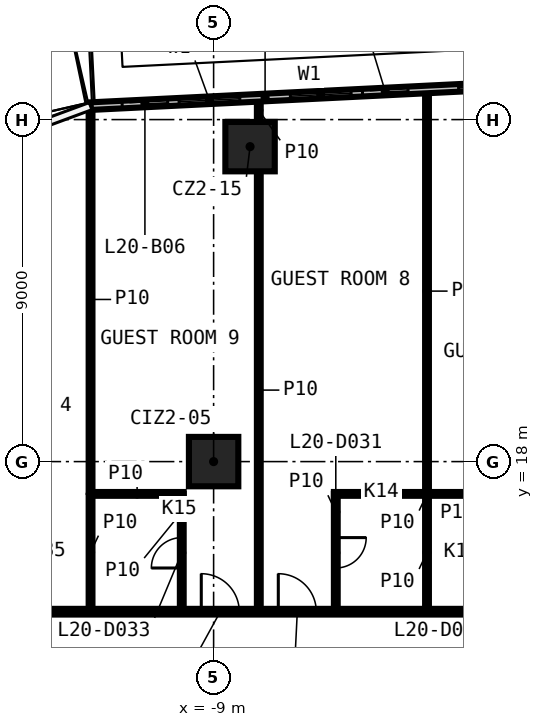
"""IFC4 building model, lengths in metres.
Left out: names, types, materials, properties, quantities, classifications, styles, units other than length and angle.
Written with IfcOpenShell. Run it as: python <this file> out.ifc"""

import sys

from ifc_helpers import new_model, si_unit, direction, frame, frame_2d, origin, origin_2d, place, context, subcontext, project, spatial, rectangle, extrude, element, fill, save


model = new_model("IFC4")
c1 = context("Model", 3, precision=1e-05, world=origin(), true_north=direction((0.0, 1.0)))
c2 = subcontext(c1, "Body", "Model", "MODEL_VIEW")
j1 = project(units=[si_unit("LENGTHUNIT", "METRE"), si_unit("PLANEANGLEUNIT", "RADIAN")], contexts=[c1])
p1 = place(None, origin())
s1 = spatial("IfcSite", under=j1, at=p1, CompositionType="ELEMENT")
p2 = place(p1, origin())
s2 = spatial("IfcBuilding", under=s1, at=p2, CompositionType="ELEMENT")
p3 = place(p2, frame((0.0, 0.0, 98.9)))
s3 = spatial("IfcBuildingStorey", under=s2, at=p3, CompositionType="ELEMENT", Elevation=98.9)
for number, where, z_axis, x_axis in (
    (1, (-8.041, 26.288, 0.0), (0.0, 0.0, 1.0), (1.0, 0.0, 0.0)),
    (2, (-9.0, 18.0, 0.0), (0.0, 0.0, 1.0), (1.0, 0.0, 0.0)),
):
    element("IfcColumn", number, at=place(p3, frame(where, z_axis=z_axis, x_axis=x_axis)), inside=s3, PredefinedType="COLUMN", context=c2, shape_type="SweptSolid", body=[
        extrude(rectangle(XDim=1.3, YDim=1.3, at=origin_2d()), origin(), (0.0, 0.0, 1.0), 3.25),
    ])
p4 = place(p3, frame((-17.125, 14.05, 0.0), z_axis=(0.0, 0.0, 1.0), x_axis=(1.0, 0.0, 0.0)))
e3 = element("IfcWall", 3, at=p4, inside=s3, PredefinedType="PARTITIONING", context=c2, shape_type="SweptSolid", body=[
    extrude(rectangle(XDim=34.25, YDim=0.15, at=frame_2d((17.125, 0.0))), origin(), (0.0, 0.0, 1.0), 3.25),
])
p5 = place(p4, frame((29.757, 0.0, 0.0)))
e4 = element("IfcOpeningElement", 4, at=p5, cuts=e3, PredefinedType="OPENING", context=c2, shape_type="SweptSolid", body=[
    extrude(rectangle(XDim=1.0, YDim=2.1, at=frame_2d((0.5, 1.05))), frame((0.0, 0.085, 0.0), z_axis=(0.0, -1.0, 0.0), x_axis=(1.0, 0.0, 0.0)), (0.0, 0.0, 1.0), 0.17),
])
p6 = place(p4, frame((18.682, 0.0, 0.0)))
e5 = element("IfcOpeningElement", 5, at=p6, cuts=e3, PredefinedType="OPENING", context=c2, shape_type="SweptSolid", body=[
    extrude(rectangle(XDim=1.0, YDim=2.1, at=frame_2d((0.5, 1.05))), frame((0.0, 0.085, 0.0), z_axis=(0.0, -1.0, 0.0), x_axis=(1.0, 0.0, 0.0)), (0.0, 0.0, 1.0), 0.17),
])
p7 = place(p4, frame((16.654, 0.0, 0.0)))
e6 = element("IfcOpeningElement", 6, at=p7, cuts=e3, PredefinedType="OPENING", context=c2, shape_type="SweptSolid", body=[
    extrude(rectangle(XDim=1.0, YDim=2.1, at=frame_2d((0.5, 1.05))), frame((0.0, 0.085, 0.0), z_axis=(0.0, -1.0, 0.0), x_axis=(1.0, 0.0, 0.0)), (0.0, 0.0, 1.0), 0.17),
])
p8 = place(p4, frame((9.827, 0.0, 0.0)))
e7 = element("IfcOpeningElement", 7, at=p8, cuts=e3, PredefinedType="OPENING", context=c2, shape_type="SweptSolid", body=[
    extrude(rectangle(XDim=1.0, YDim=2.1, at=frame_2d((0.5, 1.05))), frame((0.0, 0.085, 0.0), z_axis=(0.0, -1.0, 0.0), x_axis=(1.0, 0.0, 0.0)), (0.0, 0.0, 1.0), 0.17),
])
p9 = place(p4, frame((7.8, 0.0, 0.0)))
e8 = element("IfcOpeningElement", 8, at=p9, cuts=e3, PredefinedType="OPENING", context=c2, shape_type="SweptSolid", body=[
    extrude(rectangle(XDim=1.0, YDim=2.1, at=frame_2d((0.5, 1.05))), frame((0.0, 0.085, 0.0), z_axis=(0.0, -1.0, 0.0), x_axis=(1.0, 0.0, 0.0)), (0.0, 0.0, 1.0), 0.17),
])
p10 = place(p4, frame((2.56, 0.0, 0.0)))
e9 = element("IfcOpeningElement", 9, at=p10, cuts=e3, PredefinedType="OPENING", context=c2, shape_type="SweptSolid", body=[
    extrude(rectangle(XDim=0.9, YDim=2.1, at=frame_2d((0.45, 1.05))), frame((0.0, 0.085, 0.0), z_axis=(0.0, -1.0, 0.0), x_axis=(1.0, 0.0, 0.0)), (0.0, 0.0, 1.0), 0.17),
])
p11 = place(p3, frame((-12.238, 17.15, 0.0), z_axis=(0.0, 0.0, 1.0), x_axis=(1.0, 0.0, 0.0)))
e10 = element("IfcWall", 10, at=p11, inside=s3, PredefinedType="PARTITIONING", context=c2, shape_type="SweptSolid", body=[
    extrude(rectangle(XDim=2.45, YDim=0.1, at=frame_2d((1.225, 0.0))), origin(), (0.0, 0.0, 1.0), 3.25),
])
p12 = place(p3, frame((-5.834, 17.15, 0.0), z_axis=(0.0, 0.0, 1.0), x_axis=(1.0, 0.0, 0.0)))
e11 = element("IfcWall", 11, at=p12, inside=s3, PredefinedType="PARTITIONING", context=c2, shape_type="SweptSolid", body=[
    extrude(rectangle(XDim=4.9, YDim=0.1, at=frame_2d((2.45, 0.0))), origin(), (0.0, 0.0, 1.0), 3.25),
])
p13 = place(p3, frame((-3.385, 14.125, 0.0), z_axis=(0.0, 0.0, 1.0), x_axis=(0.0, 1.0, 0.0)))
e12 = element("IfcWall", 12, at=p13, inside=s3, PredefinedType="PARTITIONING", context=c2, shape_type="SweptSolid", body=[
    extrude(rectangle(XDim=2.975, YDim=0.1, at=frame_2d((1.488, 0.0))), origin(), (0.0, 0.0, 1.0), 3.25),
])
p14 = place(p3, frame((-3.385, 17.2, 0.0), z_axis=(0.0, 0.0, 1.0), x_axis=(0.0, 1.0, 0.0)))
e13 = element("IfcWall", 13, at=p14, inside=s3, PredefinedType="PARTITIONING", context=c2, shape_type="SweptSolid", body=[
    extrude(rectangle(XDim=10.573, YDim=0.1, at=frame_2d((5.287, 0.0))), origin(), (0.0, 0.0, 1.0), 3.25),
])
p15 = place(p3, frame((-5.785, 17.15, 0.0), z_axis=(0.0, 0.0, 1.0), x_axis=(0.0, -1.0, 0.0)))
e14 = element("IfcWall", 14, at=p15, inside=s3, PredefinedType="PARTITIONING", context=c2, shape_type="SweptSolid", body=[
    extrude(rectangle(XDim=3.025, YDim=0.1, at=frame_2d((1.512, 0.0))), origin(), (0.0, 0.0, 1.0), 3.25),
])
p16 = place(p15, frame((1.15, 0.0, 0.0)))
e15 = element("IfcOpeningElement", 15, at=p16, cuts=e14, PredefinedType="OPENING", context=c2, shape_type="SweptSolid", body=[
    extrude(rectangle(XDim=0.8, YDim=2.1, at=frame_2d((0.4, 1.05))), frame((0.0, 0.06, 0.0), z_axis=(0.0, -1.0, 0.0), x_axis=(1.0, 0.0, 0.0)), (0.0, 0.0, 1.0), 0.12),
])
p17 = place(p3, frame((-7.811, 14.125, 0.0), z_axis=(0.0, 0.0, 1.0), x_axis=(0.0, 1.0, 0.0)))
e16 = element("IfcWall", 16, at=p17, inside=s3, PredefinedType="PARTITIONING", context=c2, shape_type="SweptSolid", body=[
    extrude(rectangle(XDim=11.513, YDim=0.1, at=frame_2d((5.756, 0.0))), origin(), (0.0, 0.0, 1.0), 3.25),
])
p18 = place(p3, frame((-7.811, 26.938, 0.0), z_axis=(0.0, 0.0, 1.0), x_axis=(0.0, 1.0, 0.0)))
e17 = element("IfcWall", 17, at=p18, inside=s3, PredefinedType="PARTITIONING", context=c2, shape_type="SweptSolid", body=[
    extrude(rectangle(XDim=0.615, YDim=0.1, at=frame_2d((0.308, 0.0))), origin(), (0.0, 0.0, 1.0), 3.25),
])
p19 = place(p3, frame((-9.838, 14.125, 0.0), z_axis=(0.0, 0.0, 1.0), x_axis=(0.0, 1.0, 0.0)))
e18 = element("IfcWall", 18, at=p19, inside=s3, PredefinedType="PARTITIONING", context=c2, shape_type="SweptSolid", body=[
    extrude(rectangle(XDim=3.025, YDim=0.1, at=frame_2d((1.512, 0.0))), origin(), (0.0, 0.0, 1.0), 3.25),
])
p20 = place(p19, frame((1.075, 0.0, 0.0)))
e19 = element("IfcOpeningElement", 19, at=p20, cuts=e18, PredefinedType="OPENING", context=c2, shape_type="SweptSolid", body=[
    extrude(rectangle(XDim=0.8, YDim=2.1, at=frame_2d((0.4, 1.05))), frame((0.0, 0.06, 0.0), z_axis=(0.0, -1.0, 0.0), x_axis=(1.0, 0.0, 0.0)), (0.0, 0.0, 1.0), 0.12),
])
p21 = place(p3, frame((-12.238, 14.125, 0.0), z_axis=(0.0, 0.0, 1.0), x_axis=(0.0, 1.0, 0.0)))
e20 = element("IfcWall", 20, at=p21, inside=s3, PredefinedType="PARTITIONING", context=c2, shape_type="SweptSolid", body=[
    extrude(rectangle(XDim=2.975, YDim=0.1, at=frame_2d((1.488, 0.0))), origin(), (0.0, 0.0, 1.0), 3.25),
])
p22 = place(p3, frame((-12.238, 17.2, 0.0), z_axis=(0.0, 0.0, 1.0), x_axis=(0.0, 1.0, 0.0)))
e21 = element("IfcWall", 21, at=p22, inside=s3, PredefinedType="PARTITIONING", context=c2, shape_type="SweptSolid", body=[
    extrude(rectangle(XDim=10.133, YDim=0.1, at=frame_2d((5.067, 0.0))), origin(), (0.0, 0.0, 1.0), 3.25),
])
p23 = place(p3, frame((1.042, 28.012, 0.0), z_axis=(0.0, 0.0, 1.0), x_axis=(-0.998772222794, -0.049538338427, 0.0)))
e22 = element("IfcWall", 22, at=p23, inside=s3, PredefinedType="SOLIDWALL", context=c2, shape_type="SweptSolid", body=[
    extrude(rectangle(XDim=13.297, YDim=0.2, at=frame_2d((6.648, 0.0))), origin(), (0.0, 0.0, 1.0), 3.25),
])
p24 = place(p23, frame((2.0, 0.0, 0.6)))
e23 = element("IfcOpeningElement", 23, at=p24, cuts=e22, PredefinedType="OPENING", context=c2, shape_type="SweptSolid", body=[
    extrude(rectangle(XDim=1.6, YDim=2.4, at=frame_2d((0.8, 1.2))), frame((0.0, 0.11, 0.0), z_axis=(0.0, -1.0, 0.0), x_axis=(1.0, 0.0, 0.0)), (0.0, 0.0, 1.0), 0.22),
])
p25 = place(p23, frame((0.5, 0.0, 0.0)))
e24 = element("IfcOpeningElement", 24, at=p25, cuts=e22, PredefinedType="OPENING", context=c2, shape_type="SweptSolid", body=[
    extrude(rectangle(XDim=1.2, YDim=2.4, at=frame_2d((0.6, 1.2))), frame((0.0, 0.11, 0.0), z_axis=(0.0, -1.0, 0.0), x_axis=(1.0, 0.0, 0.0)), (0.0, 0.0, 1.0), 0.22),
])
p26 = place(p23, frame((6.432, 0.0, 0.6)))
e25 = element("IfcOpeningElement", 25, at=p26, cuts=e22, PredefinedType="OPENING", context=c2, shape_type="SweptSolid", body=[
    extrude(rectangle(XDim=1.6, YDim=2.4, at=frame_2d((0.8, 1.2))), frame((0.0, 0.11, 0.0), z_axis=(0.0, -1.0, 0.0), x_axis=(1.0, 0.0, 0.0)), (0.0, 0.0, 1.0), 0.22),
])
p27 = place(p23, frame((4.932, 0.0, 0.0)))
e26 = element("IfcOpeningElement", 26, at=p27, cuts=e22, PredefinedType="OPENING", context=c2, shape_type="SweptSolid", body=[
    extrude(rectangle(XDim=1.2, YDim=2.4, at=frame_2d((0.6, 1.2))), frame((0.0, 0.11, 0.0), z_axis=(0.0, -1.0, 0.0), x_axis=(1.0, 0.0, 0.0)), (0.0, 0.0, 1.0), 0.22),
])
p28 = place(p23, frame((9.365, 0.0, 0.6)))
e27 = element("IfcOpeningElement", 27, at=p28, cuts=e22, PredefinedType="OPENING", context=c2, shape_type="SweptSolid", body=[
    extrude(rectangle(XDim=1.6, YDim=2.4, at=frame_2d((0.8, 1.2))), frame((0.0, 0.11, 0.0), z_axis=(0.0, -1.0, 0.0), x_axis=(1.0, 0.0, 0.0)), (0.0, 0.0, 1.0), 0.22),
])
p29 = place(p23, frame((11.264, 0.0, 0.0)))
e28 = element("IfcOpeningElement", 28, at=p29, cuts=e22, PredefinedType="OPENING", context=c2, shape_type="SweptSolid", body=[
    extrude(rectangle(XDim=1.2, YDim=2.4, at=frame_2d((0.6, 1.2))), frame((0.0, 0.11, 0.0), z_axis=(0.0, -1.0, 0.0), x_axis=(1.0, 0.0, 0.0)), (0.0, 0.0, 1.0), 0.22),
])
p30 = place(p16, origin())
e29 = element("IfcDoor", 29, at=p30, inside=s3, OperationType="SINGLE_SWING_LEFT", PredefinedType="DOOR", context=c2, shape_type="SweptSolid", body=[
    extrude(rectangle(XDim=0.8, YDim=2.1, at=frame_2d((0.4, 1.05))), frame((0.0, 0.025, 0.0), z_axis=(0.0, -1.0, 0.0), x_axis=(1.0, 0.0, 0.0)), (0.0, 0.0, 1.0), 0.05),
])
fill(e15, e29)
p31 = place(p8, origin())
e30 = element("IfcDoor", 30, at=p31, inside=s3, OperationType="SINGLE_SWING_RIGHT", PredefinedType="DOOR", context=c2, shape_type="SweptSolid", body=[
    extrude(rectangle(XDim=1.0, YDim=2.1, at=frame_2d((0.5, 1.05))), frame((0.0, 0.025, 0.0), z_axis=(0.0, -1.0, 0.0), x_axis=(1.0, 0.0, 0.0)), (0.0, 0.0, 1.0), 0.05),
])
fill(e7, e30)
p32 = place(p20, origin())
e31 = element("IfcDoor", 31, at=p32, inside=s3, OperationType="SINGLE_SWING_RIGHT", PredefinedType="DOOR", context=c2, shape_type="SweptSolid", body=[
    extrude(rectangle(XDim=0.8, YDim=2.1, at=frame_2d((0.4, 1.05))), frame((0.0, 0.025, 0.0), z_axis=(0.0, -1.0, 0.0), x_axis=(1.0, 0.0, 0.0)), (0.0, 0.0, 1.0), 0.05),
])
fill(e19, e31)
p33 = place(p9, origin())
e32 = element("IfcDoor", 32, at=p33, inside=s3, OperationType="SINGLE_SWING_LEFT", PredefinedType="DOOR", context=c2, shape_type="SweptSolid", body=[
    extrude(rectangle(XDim=1.0, YDim=2.1, at=frame_2d((0.5, 1.05))), frame((0.0, 0.025, 0.0), z_axis=(0.0, -1.0, 0.0), x_axis=(1.0, 0.0, 0.0)), (0.0, 0.0, 1.0), 0.05),
])
fill(e8, e32)
p34 = place(p24, origin())
e33 = element("IfcWindow", 33, at=p34, inside=s3, PartitioningType="SINGLE_PANEL", PredefinedType="WINDOW", context=c2, shape_type="SweptSolid", body=[
    extrude(rectangle(XDim=1.6, YDim=2.4, at=frame_2d((0.8, 1.2))), frame((0.0, 0.03, 0.0), z_axis=(0.0, -1.0, 0.0), x_axis=(1.0, 0.0, 0.0)), (0.0, 0.0, 1.0), 0.06),
])
fill(e23, e33)
p35 = place(p26, origin())
e34 = element("IfcWindow", 34, at=p35, inside=s3, PartitioningType="SINGLE_PANEL", PredefinedType="WINDOW", context=c2, shape_type="SweptSolid", body=[
    extrude(rectangle(XDim=1.6, YDim=2.4, at=frame_2d((0.8, 1.2))), frame((0.0, 0.03, 0.0), z_axis=(0.0, -1.0, 0.0), x_axis=(1.0, 0.0, 0.0)), (0.0, 0.0, 1.0), 0.06),
])
fill(e25, e34)
p36 = place(p27, origin())
e35 = element("IfcDoor", 35, at=p36, inside=s3, OperationType="SLIDING_TO_LEFT", PredefinedType="DOOR", context=c2, shape_type="SweptSolid", body=[
    extrude(rectangle(XDim=1.2, YDim=2.4, at=frame_2d((0.6, 1.2))), frame((0.0, 0.025, 0.0), z_axis=(0.0, -1.0, 0.0), x_axis=(1.0, 0.0, 0.0)), (0.0, 0.0, 1.0), 0.05),
])
fill(e26, e35)
p37 = place(p28, origin())
e36 = element("IfcWindow", 36, at=p37, inside=s3, PartitioningType="SINGLE_PANEL", PredefinedType="WINDOW", context=c2, shape_type="SweptSolid", body=[
    extrude(rectangle(XDim=1.6, YDim=2.4, at=frame_2d((0.8, 1.2))), frame((0.0, 0.03, 0.0), z_axis=(0.0, -1.0, 0.0), x_axis=(1.0, 0.0, 0.0)), (0.0, 0.0, 1.0), 0.06),
])
fill(e27, e36)
p38 = place(p29, origin())
e37 = element("IfcDoor", 37, at=p38, inside=s3, OperationType="SLIDING_TO_LEFT", PredefinedType="DOOR", context=c2, shape_type="SweptSolid", body=[
    extrude(rectangle(XDim=1.2, YDim=2.4, at=frame_2d((0.6, 1.2))), frame((0.0, 0.025, 0.0), z_axis=(0.0, -1.0, 0.0), x_axis=(1.0, 0.0, 0.0)), (0.0, 0.0, 1.0), 0.05),
])
fill(e28, e37)
save(model, sys.argv[1])
